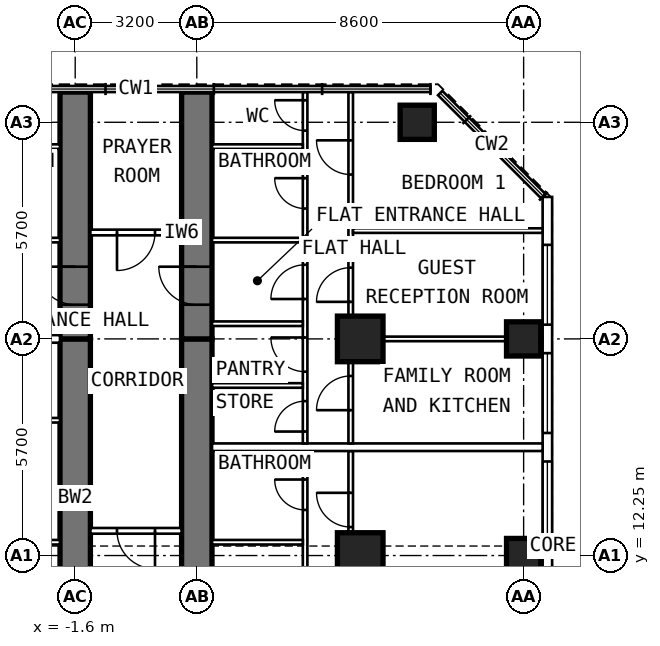
"""IFC4 building model, lengths in metres.
Left out: names, types, materials, properties, quantities, classifications, styles, units other than length and angle.
Written with IfcOpenShell. Run it as: python <this file> out.ifc"""

import sys

from ifc_helpers import new_model, si_unit, direction, frame, frame_2d, origin, origin_2d, place, context, subcontext, project, spatial, rectangle, extrude, element, fill, save


model = new_model("IFC4")
c1 = context("Model", 3, precision=1e-05, world=origin(), true_north=direction((0.0, 1.0)))
c2 = subcontext(c1, "Body", "Model", "MODEL_VIEW")
j1 = project(units=[si_unit("LENGTHUNIT", "METRE"), si_unit("PLANEANGLEUNIT", "RADIAN")], contexts=[c1])
p1 = place(None, origin())
s1 = spatial("IfcSite", under=j1, at=p1, CompositionType="ELEMENT")
p2 = place(p1, origin())
s2 = spatial("IfcBuilding", under=s1, at=p2, CompositionType="ELEMENT")
p3 = place(p2, frame((0.0, 0.0, 131.0)))
s3 = spatial("IfcBuildingStorey", under=s2, at=p3, CompositionType="ELEMENT", Elevation=131.0)
for number, where, z_axis, x_axis in (
    (1, (10.2, 12.25, 0.0), (0.0, 0.0, 1.0), (0.0, 1.0, 0.0)),
    (2, (10.2, 17.95, 0.0), (0.0, 0.0, 1.0), (0.0, 1.0, 0.0)),
    (3, (7.4, 23.65, 0.0), (0.0, 0.0, 1.0), (0.0, 1.0, 0.0)),
):
    element("IfcColumn", number, at=place(p3, frame(where, z_axis=z_axis, x_axis=x_axis)), inside=s3, PredefinedType="COLUMN", context=c2, shape_type="SweptSolid", body=[
        extrude(rectangle(XDim=0.9, YDim=0.9, at=origin_2d()), origin(), (0.0, 0.0, 1.0), 3.6),
    ])
for number, where, z_axis, x_axis in (
    (4, (5.9, 12.25, 0.0), (0.0, 0.0, 1.0), (0.0, 1.0, 0.0)),
    (5, (5.9, 17.95, 0.0), (0.0, 0.0, 1.0), (0.0, 1.0, 0.0)),
):
    element("IfcColumn", number, at=place(p3, frame(where, z_axis=z_axis, x_axis=x_axis)), inside=s3, PredefinedType="COLUMN", context=c2, shape_type="SweptSolid", body=[
        extrude(rectangle(XDim=1.2, YDim=1.2, at=origin_2d()), origin(), (0.0, 0.0, 1.0), 3.6),
    ])
p4 = place(p3, frame((-1.6, 9.6, 0.0), z_axis=(0.0, 0.0, 1.0), x_axis=(0.0, 1.0, 0.0)))
e6 = element("IfcWall", 6, at=p4, inside=s3, PredefinedType="SHEAR", context=c2, shape_type="SweptSolid", body=[
    extrude(rectangle(XDim=8.35, YDim=0.8, at=frame_2d((4.175, 0.0))), origin(), (0.0, 0.0, 1.0), 3.6),
])
p5 = place(p4, frame((1.3, 0.0, 0.0)))
e7 = element("IfcOpeningElement", 7, at=p5, cuts=e6, PredefinedType="OPENING", context=c2, shape_type="SweptSolid", body=[
    extrude(rectangle(XDim=1.0, YDim=2.1, at=frame_2d((0.5, 1.05))), frame((0.0, 0.412, 0.0), z_axis=(0.0, -1.0, 0.0), x_axis=(1.0, 0.0, 0.0)), (0.0, 0.0, 1.0), 0.824),
])
p6 = place(p3, frame((-1.6, 17.95, 0.0), z_axis=(0.0, 0.0, 1.0), x_axis=(0.0, 1.0, 0.0)))
e8 = element("IfcWall", 8, at=p6, inside=s3, PredefinedType="SHEAR", context=c2, shape_type="SweptSolid", body=[
    extrude(rectangle(XDim=6.495, YDim=0.8, at=frame_2d((3.248, 0.0))), origin(), (0.0, 0.0, 1.0), 3.6),
])
p7 = place(p6, frame((0.9, 0.0, 0.0)))
e9 = element("IfcOpeningElement", 9, at=p7, cuts=e8, PredefinedType="OPENING", context=c2, shape_type="SweptSolid", body=[
    extrude(rectangle(XDim=1.0, YDim=2.1, at=frame_2d((0.5, 1.05))), frame((0.0, 0.412, 0.0), z_axis=(0.0, -1.0, 0.0), x_axis=(1.0, 0.0, 0.0)), (0.0, 0.0, 1.0), 0.824),
])
p8 = place(p3, frame((1.6, 9.6, 0.0), z_axis=(0.0, 0.0, 1.0), x_axis=(0.0, 1.0, 0.0)))
e10 = element("IfcWall", 10, at=p8, inside=s3, PredefinedType="SHEAR", context=c2, shape_type="SweptSolid", body=[
    extrude(rectangle(XDim=8.35, YDim=0.8, at=frame_2d((4.175, 0.0))), origin(), (0.0, 0.0, 1.0), 3.6),
])
p9 = place(p8, frame((1.3, 0.0, 0.0)))
e11 = element("IfcOpeningElement", 11, at=p9, cuts=e10, PredefinedType="OPENING", context=c2, shape_type="SweptSolid", body=[
    extrude(rectangle(XDim=1.0, YDim=2.1, at=frame_2d((0.5, 1.05))), frame((0.0, 0.412, 0.0), z_axis=(0.0, -1.0, 0.0), x_axis=(1.0, 0.0, 0.0)), (0.0, 0.0, 1.0), 0.824),
])
p10 = place(p3, frame((1.6, 17.95, 0.0), z_axis=(0.0, 0.0, 1.0), x_axis=(0.0, 1.0, 0.0)))
e12 = element("IfcWall", 12, at=p10, inside=s3, PredefinedType="SHEAR", context=c2, shape_type="SweptSolid", body=[
    extrude(rectangle(XDim=6.495, YDim=0.8, at=frame_2d((3.248, 0.0))), origin(), (0.0, 0.0, 1.0), 3.6),
])
p11 = place(p10, frame((0.9, 0.0, 0.0)))
e13 = element("IfcOpeningElement", 13, at=p11, cuts=e12, PredefinedType="OPENING", context=c2, shape_type="SweptSolid", body=[
    extrude(rectangle(XDim=1.0, YDim=2.1, at=frame_2d((0.5, 1.05))), frame((0.0, 0.412, 0.0), z_axis=(0.0, -1.0, 0.0), x_axis=(1.0, 0.0, 0.0)), (0.0, 0.0, 1.0), 0.824),
])
p12 = place(p3, frame((10.825, 6.409, 0.0), z_axis=(0.0, 0.0, 1.0), x_axis=(0.0, 1.0, 0.0)))
e14 = element("IfcWall", 14, at=p12, inside=s3, PredefinedType="SOLIDWALL", context=c2, shape_type="SweptSolid", body=[
    extrude(rectangle(XDim=15.276, YDim=0.25, at=frame_2d((7.638, 0.0))), origin(), (0.0, 0.0, 1.0), 3.35),
])
p13 = place(p12, frame((0.516, 0.0, 0.8)))
e15 = element("IfcOpeningElement", 15, at=p13, cuts=e14, PredefinedType="OPENING", context=c2, shape_type="SweptSolid", body=[
    extrude(rectangle(XDim=2.1, YDim=1.8, at=frame_2d((1.05, 0.9))), frame((0.0, 0.137, 0.0), z_axis=(0.0, -1.0, 0.0), x_axis=(1.0, 0.0, 0.0)), (0.0, 0.0, 1.0), 0.274),
])
p14 = place(p12, frame((3.366, 0.0, 0.8)))
e16 = element("IfcOpeningElement", 16, at=p14, cuts=e14, PredefinedType="OPENING", context=c2, shape_type="SweptSolid", body=[
    extrude(rectangle(XDim=2.1, YDim=1.8, at=frame_2d((1.05, 0.9))), frame((0.0, 0.137, 0.0), z_axis=(0.0, -1.0, 0.0), x_axis=(1.0, 0.0, 0.0)), (0.0, 0.0, 1.0), 0.274),
])
p15 = place(p12, frame((6.216, 0.0, 0.8)))
e17 = element("IfcOpeningElement", 17, at=p15, cuts=e14, PredefinedType="OPENING", context=c2, shape_type="SweptSolid", body=[
    extrude(rectangle(XDim=2.1, YDim=1.8, at=frame_2d((1.05, 0.9))), frame((0.0, 0.137, 0.0), z_axis=(0.0, -1.0, 0.0), x_axis=(1.0, 0.0, 0.0)), (0.0, 0.0, 1.0), 0.274),
])
p16 = place(p12, frame((9.066, 0.0, 0.8)))
e18 = element("IfcOpeningElement", 18, at=p16, cuts=e14, PredefinedType="OPENING", context=c2, shape_type="SweptSolid", body=[
    extrude(rectangle(XDim=2.1, YDim=1.8, at=frame_2d((1.05, 0.9))), frame((0.0, 0.137, 0.0), z_axis=(0.0, -1.0, 0.0), x_axis=(1.0, 0.0, 0.0)), (0.0, 0.0, 1.0), 0.274),
])
p17 = place(p12, frame((11.916, 0.0, 0.8)))
e19 = element("IfcOpeningElement", 19, at=p17, cuts=e14, PredefinedType="OPENING", context=c2, shape_type="SweptSolid", body=[
    extrude(rectangle(XDim=2.1, YDim=1.8, at=frame_2d((1.05, 0.9))), frame((0.0, 0.137, 0.0), z_axis=(0.0, -1.0, 0.0), x_axis=(1.0, 0.0, 0.0)), (0.0, 0.0, 1.0), 0.274),
])
p18 = place(p3, frame((-2.0, 12.6, 0.0), z_axis=(0.0, 0.0, 1.0), x_axis=(-1.0, 0.0, 0.0)))
e20 = element("IfcWall", 20, at=p18, inside=s3, PredefinedType="PARTITIONING", context=c2, shape_type="SweptSolid", body=[
    extrude(rectangle(XDim=2.39, YDim=0.12, at=frame_2d((1.195, 0.0))), origin(), (0.0, 0.0, 1.0), 2.45),
])
for number, where, z_axis, x_axis in (
    (21, (-2.0, 15.81, 0.0), (0.0, 0.0, 1.0), (-1.0, 0.0, 0.0)),
    (22, (-2.0, 20.55, 0.0), (0.0, 0.0, 1.0), (-1.0, 0.0, 0.0)),
    (23, (-2.0, 23.01, 0.0), (0.0, 0.0, 1.0), (-1.0, 0.0, 0.0)),
):
    element("IfcWall", number, at=place(p3, frame(where, z_axis=z_axis, x_axis=x_axis)), inside=s3, PredefinedType="PARTITIONING", context=c2, shape_type="SweptSolid", body=[
        extrude(rectangle(XDim=2.39, YDim=0.12, at=frame_2d((1.195, 0.0))), origin(), (0.0, 0.0, 1.0), 3.35),
    ])
p19 = place(p3, frame((-2.0, 17.95, 0.0), z_axis=(0.0, 0.0, 1.0), x_axis=(-1.0, 0.0, 0.0)))
e24 = element("IfcWall", 24, at=p19, inside=s3, PredefinedType="PARTITIONING", context=c2, shape_type="SweptSolid", body=[
    extrude(rectangle(XDim=8.7, YDim=0.2, at=frame_2d((4.35, 0.0))), origin(), (0.0, 0.0, 1.0), 2.45),
])
p20 = place(p3, frame((4.45, 10.05, 0.0), z_axis=(0.0, 0.0, 1.0), x_axis=(0.0, 1.0, 0.0)))
e25 = element("IfcWall", 25, at=p20, inside=s3, PredefinedType="PARTITIONING", context=c2, shape_type="SweptSolid", body=[
    extrude(rectangle(XDim=4.95, YDim=0.12, at=frame_2d((2.475, 0.0))), origin(), (0.0, 0.0, 1.0), 3.35),
])
p21 = place(p20, frame((0.8, 0.0, 0.0)))
e26 = element("IfcOpeningElement", 26, at=p21, cuts=e25, PredefinedType="OPENING", context=c2, shape_type="SweptSolid", body=[
    extrude(rectangle(XDim=0.9, YDim=2.1, at=frame_2d((0.45, 1.05))), frame((0.0, 0.072, 0.0), z_axis=(0.0, -1.0, 0.0), x_axis=(1.0, 0.0, 0.0)), (0.0, 0.0, 1.0), 0.144),
])
p22 = place(p20, frame((3.4, 0.0, 0.0)))
e27 = element("IfcOpeningElement", 27, at=p22, cuts=e25, PredefinedType="OPENING", context=c2, shape_type="SweptSolid", body=[
    extrude(rectangle(XDim=0.8, YDim=2.1, at=frame_2d((0.4, 1.05))), frame((0.0, 0.072, 0.0), z_axis=(0.0, -1.0, 0.0), x_axis=(1.0, 0.0, 0.0)), (0.0, 0.0, 1.0), 0.144),
])
p23 = place(p3, frame((5.65, 9.6, 0.0), z_axis=(0.0, 0.0, 1.0), x_axis=(0.0, 1.0, 0.0)))
e28 = element("IfcWall", 28, at=p23, inside=s3, PredefinedType="PARTITIONING", context=c2, shape_type="SweptSolid", body=[
    extrude(rectangle(XDim=5.4, YDim=0.12, at=frame_2d((2.7, 0.0))), origin(), (0.0, 0.0, 1.0), 3.35),
])
p24 = place(p23, frame((3.4, 0.0, 0.0)))
e29 = element("IfcOpeningElement", 29, at=p24, cuts=e28, PredefinedType="OPENING", context=c2, shape_type="SweptSolid", body=[
    extrude(rectangle(XDim=0.9, YDim=2.1, at=frame_2d((0.45, 1.05))), frame((0.0, 0.072, 0.0), z_axis=(0.0, -1.0, 0.0), x_axis=(1.0, 0.0, 0.0)), (0.0, 0.0, 1.0), 0.144),
])
p25 = place(p3, frame((2.0, 12.6, 0.0), z_axis=(0.0, 0.0, 1.0), x_axis=(1.0, 0.0, 0.0)))
e30 = element("IfcWall", 30, at=p25, inside=s3, PredefinedType="PARTITIONING", context=c2, shape_type="SweptSolid", body=[
    extrude(rectangle(XDim=2.39, YDim=0.12, at=frame_2d((1.195, 0.0))), origin(), (0.0, 0.0, 1.0), 2.45),
])
p26 = place(p3, frame((4.45, 15.2, 0.0), z_axis=(0.0, 0.0, 1.0), x_axis=(0.0, 1.0, 0.0)))
e31 = element("IfcWall", 31, at=p26, inside=s3, PredefinedType="PARTITIONING", context=c2, shape_type="SweptSolid", body=[
    extrude(rectangle(XDim=9.245, YDim=0.12, at=frame_2d((4.623, 0.0))), origin(), (0.0, 0.0, 1.0), 3.35),
])
p27 = place(p26, frame((0.312, 0.0, 0.0)))
e32 = element("IfcOpeningElement", 32, at=p27, cuts=e31, PredefinedType="OPENING", context=c2, shape_type="SweptSolid", body=[
    extrude(rectangle(XDim=0.8, YDim=2.1, at=frame_2d((0.4, 1.05))), frame((0.0, 0.072, 0.0), z_axis=(0.0, -1.0, 0.0), x_axis=(1.0, 0.0, 0.0)), (0.0, 0.0, 1.0), 0.144),
])
p28 = place(p26, frame((1.887, 0.0, 0.0)))
e33 = element("IfcOpeningElement", 33, at=p28, cuts=e31, PredefinedType="OPENING", context=c2, shape_type="SweptSolid", body=[
    extrude(rectangle(XDim=0.9, YDim=2.1, at=frame_2d((0.45, 1.05))), frame((0.0, 0.072, 0.0), z_axis=(0.0, -1.0, 0.0), x_axis=(1.0, 0.0, 0.0)), (0.0, 0.0, 1.0), 0.144),
])
p29 = place(p26, frame((3.8, 0.0, 0.0)))
e34 = element("IfcOpeningElement", 34, at=p29, cuts=e31, PredefinedType="OPENING", context=c2, shape_type="SweptSolid", body=[
    extrude(rectangle(XDim=0.9, YDim=2.1, at=frame_2d((0.45, 1.05))), frame((0.0, 0.072, 0.0), z_axis=(0.0, -1.0, 0.0), x_axis=(1.0, 0.0, 0.0)), (0.0, 0.0, 1.0), 0.144),
])
p30 = place(p26, frame((6.18, 0.0, 0.0)))
e35 = element("IfcOpeningElement", 35, at=p30, cuts=e31, PredefinedType="OPENING", context=c2, shape_type="SweptSolid", body=[
    extrude(rectangle(XDim=0.8, YDim=2.1, at=frame_2d((0.4, 1.05))), frame((0.0, 0.072, 0.0), z_axis=(0.0, -1.0, 0.0), x_axis=(1.0, 0.0, 0.0)), (0.0, 0.0, 1.0), 0.144),
])
p31 = place(p26, frame((8.23, 0.0, 0.0)))
e36 = element("IfcOpeningElement", 36, at=p31, cuts=e31, PredefinedType="OPENING", context=c2, shape_type="SweptSolid", body=[
    extrude(rectangle(XDim=0.8, YDim=2.1, at=frame_2d((0.4, 1.05))), frame((0.0, 0.072, 0.0), z_axis=(0.0, -1.0, 0.0), x_axis=(1.0, 0.0, 0.0)), (0.0, 0.0, 1.0), 0.144),
])
p32 = place(p3, frame((5.65, 15.2, 0.0), z_axis=(0.0, 0.0, 1.0), x_axis=(0.0, 1.0, 0.0)))
e37 = element("IfcWall", 37, at=p32, inside=s3, PredefinedType="PARTITIONING", context=c2, shape_type="SweptSolid", body=[
    extrude(rectangle(XDim=9.245, YDim=0.12, at=frame_2d((4.623, 0.0))), origin(), (0.0, 0.0, 1.0), 3.35),
])
p33 = place(p32, frame((0.875, 0.0, 0.0)))
e38 = element("IfcOpeningElement", 38, at=p33, cuts=e37, PredefinedType="OPENING", context=c2, shape_type="SweptSolid", body=[
    extrude(rectangle(XDim=0.9, YDim=2.1, at=frame_2d((0.45, 1.05))), frame((0.0, 0.072, 0.0), z_axis=(0.0, -1.0, 0.0), x_axis=(1.0, 0.0, 0.0)), (0.0, 0.0, 1.0), 0.144),
])
p34 = place(p32, frame((3.725, 0.0, 0.0)))
e39 = element("IfcOpeningElement", 39, at=p34, cuts=e37, PredefinedType="OPENING", context=c2, shape_type="SweptSolid", body=[
    extrude(rectangle(XDim=0.9, YDim=2.1, at=frame_2d((0.45, 1.05))), frame((0.0, 0.072, 0.0), z_axis=(0.0, -1.0, 0.0), x_axis=(1.0, 0.0, 0.0)), (0.0, 0.0, 1.0), 0.144),
])
p35 = place(p32, frame((7.075, 0.0, 0.0)))
e40 = element("IfcOpeningElement", 40, at=p35, cuts=e37, PredefinedType="OPENING", context=c2, shape_type="SweptSolid", body=[
    extrude(rectangle(XDim=0.9, YDim=2.1, at=frame_2d((0.45, 1.05))), frame((0.0, 0.072, 0.0), z_axis=(0.0, -1.0, 0.0), x_axis=(1.0, 0.0, 0.0)), (0.0, 0.0, 1.0), 0.144),
])
p36 = place(p3, frame((5.71, 17.95, 0.0), z_axis=(0.0, 0.0, 1.0), x_axis=(1.0, 0.0, 0.0)))
e41 = element("IfcWall", 41, at=p36, inside=s3, PredefinedType="PARTITIONING", context=c2, shape_type="SweptSolid", body=[
    extrude(rectangle(XDim=4.99, YDim=0.12, at=frame_2d((2.495, 0.0))), origin(), (0.0, 0.0, 1.0), 2.45),
])
p37 = place(p3, frame((5.71, 20.8, 0.0), z_axis=(0.0, 0.0, 1.0), x_axis=(1.0, 0.0, 0.0)))
e42 = element("IfcWall", 42, at=p37, inside=s3, PredefinedType="PARTITIONING", context=c2, shape_type="SweptSolid", body=[
    extrude(rectangle(XDim=4.99, YDim=0.12, at=frame_2d((2.495, 0.0))), origin(), (0.0, 0.0, 1.0), 3.35),
])
for number, where, z_axis, x_axis in (
    (43, (2.0, 16.725, 0.0), (0.0, 0.0, 1.0), (1.0, 0.0, 0.0)),
    (44, (2.0, 18.35, 0.0), (0.0, 0.0, 1.0), (1.0, 0.0, 0.0)),
    (45, (2.0, 20.55, 0.0), (0.0, 0.0, 1.0), (1.0, 0.0, 0.0)),
    (46, (2.0, 23.01, 0.0), (0.0, 0.0, 1.0), (1.0, 0.0, 0.0)),
):
    element("IfcWall", number, at=place(p3, frame(where, z_axis=z_axis, x_axis=x_axis)), inside=s3, PredefinedType="PARTITIONING", context=c2, shape_type="SweptSolid", body=[
        extrude(rectangle(XDim=2.39, YDim=0.12, at=frame_2d((1.195, 0.0))), origin(), (0.0, 0.0, 1.0), 3.35),
    ])
p38 = place(p3, frame((2.0, 15.1, 0.0), z_axis=(0.0, 0.0, 1.0), x_axis=(1.0, 0.0, 0.0)))
e47 = element("IfcWall", 47, at=p38, inside=s3, PredefinedType="PARTITIONING", context=c2, shape_type="SweptSolid", body=[
    extrude(rectangle(XDim=8.7, YDim=0.2, at=frame_2d((4.35, 0.0))), origin(), (0.0, 0.0, 1.0), 3.35),
])
p39 = place(p3, frame((1.2, 20.75, 0.0), z_axis=(0.0, 0.0, 1.0), x_axis=(-1.0, 0.0, 0.0)))
e48 = element("IfcWall", 48, at=p39, inside=s3, PredefinedType="PARTITIONING", context=c2, shape_type="SweptSolid", body=[
    extrude(rectangle(XDim=2.4, YDim=0.15, at=frame_2d((1.2, 0.0))), origin(), (0.0, 0.0, 1.0), 3.35),
])
p40 = place(p39, frame((0.7, 0.0, 0.0)))
e49 = element("IfcOpeningElement", 49, at=p40, cuts=e48, PredefinedType="OPENING", context=c2, shape_type="SweptSolid", body=[
    extrude(rectangle(XDim=1.0, YDim=2.1, at=frame_2d((0.5, 1.05))), frame((0.0, 0.087, 0.0), z_axis=(0.0, -1.0, 0.0), x_axis=(1.0, 0.0, 0.0)), (0.0, 0.0, 1.0), 0.174),
])
p41 = place(p3, frame((1.2, 12.9, 0.0), z_axis=(0.0, 0.0, 1.0), x_axis=(-1.0, 0.0, 0.0)))
e50 = element("IfcWall", 50, at=p41, inside=s3, PredefinedType="PARTITIONING", context=c2, shape_type="SweptSolid", body=[
    extrude(rectangle(XDim=2.4, YDim=0.15, at=frame_2d((1.2, 0.0))), origin(), (0.0, 0.0, 1.0), 3.35),
])
p42 = place(p41, frame((0.7, 0.0, 0.0)))
e51 = element("IfcOpeningElement", 51, at=p42, cuts=e50, PredefinedType="OPENING", context=c2, shape_type="SweptSolid", body=[
    extrude(rectangle(XDim=1.0, YDim=2.1, at=frame_2d((0.5, 1.05))), frame((0.0, 0.087, 0.0), z_axis=(0.0, -1.0, 0.0), x_axis=(1.0, 0.0, 0.0)), (0.0, 0.0, 1.0), 0.174),
])
p43 = place(p15, origin())
e52 = element("IfcWindow", 52, at=p43, inside=s3, PartitioningType="SINGLE_PANEL", PredefinedType="WINDOW", context=c2, shape_type="SweptSolid", body=[
    extrude(rectangle(XDim=2.1, YDim=1.8, at=frame_2d((1.05, 0.9))), frame((0.0, 0.03, 0.0), z_axis=(0.0, -1.0, 0.0), x_axis=(1.0, 0.0, 0.0)), (0.0, 0.0, 1.0), 0.06),
])
fill(e17, e52)
p44 = place(p16, origin())
e53 = element("IfcWindow", 53, at=p44, inside=s3, PartitioningType="SINGLE_PANEL", PredefinedType="WINDOW", context=c2, shape_type="SweptSolid", body=[
    extrude(rectangle(XDim=2.1, YDim=1.8, at=frame_2d((1.05, 0.9))), frame((0.0, 0.03, 0.0), z_axis=(0.0, -1.0, 0.0), x_axis=(1.0, 0.0, 0.0)), (0.0, 0.0, 1.0), 0.06),
])
fill(e18, e53)
p45 = place(p17, origin())
e54 = element("IfcWindow", 54, at=p45, inside=s3, PartitioningType="SINGLE_PANEL", PredefinedType="WINDOW", context=c2, shape_type="SweptSolid", body=[
    extrude(rectangle(XDim=2.1, YDim=1.8, at=frame_2d((1.05, 0.9))), frame((0.0, 0.03, 0.0), z_axis=(0.0, -1.0, 0.0), x_axis=(1.0, 0.0, 0.0)), (0.0, 0.0, 1.0), 0.06),
])
fill(e19, e54)
p46 = place(p7, origin())
e55 = element("IfcDoor", 55, at=p46, inside=s3, OperationType="SINGLE_SWING_RIGHT", PredefinedType="DOOR", context=c2, shape_type="SweptSolid", body=[
    extrude(rectangle(XDim=1.0, YDim=2.1, at=frame_2d((0.5, 1.05))), frame((0.0, 0.15, 0.0), z_axis=(0.0, -1.0, 0.0), x_axis=(1.0, 0.0, 0.0)), (0.0, 0.0, 1.0), 0.3),
])
fill(e9, e55)
p47 = place(p24, origin())
e56 = element("IfcDoor", 56, at=p47, inside=s3, OperationType="SINGLE_SWING_RIGHT", PredefinedType="DOOR", context=c2, shape_type="SweptSolid", body=[
    extrude(rectangle(XDim=0.9, YDim=2.1, at=frame_2d((0.45, 1.05))), frame((0.0, 0.025, 0.0), z_axis=(0.0, -1.0, 0.0), x_axis=(1.0, 0.0, 0.0)), (0.0, 0.0, 1.0), 0.05),
])
fill(e29, e56)
p48 = place(p22, origin())
e57 = element("IfcDoor", 57, at=p48, inside=s3, OperationType="SINGLE_SWING_RIGHT", PredefinedType="DOOR", context=c2, shape_type="SweptSolid", body=[
    extrude(rectangle(XDim=0.8, YDim=2.1, at=frame_2d((0.4, 1.05))), frame((0.0, 0.025, 0.0), z_axis=(0.0, -1.0, 0.0), x_axis=(1.0, 0.0, 0.0)), (0.0, 0.0, 1.0), 0.05),
])
fill(e27, e57)
p49 = place(p11, origin())
e58 = element("IfcDoor", 58, at=p49, inside=s3, OperationType="SINGLE_SWING_RIGHT", PredefinedType="DOOR", context=c2, shape_type="SweptSolid", body=[
    extrude(rectangle(XDim=1.0, YDim=2.1, at=frame_2d((0.5, 1.05))), frame((0.0, 0.15, 0.0), z_axis=(0.0, -1.0, 0.0), x_axis=(1.0, 0.0, 0.0)), (0.0, 0.0, 1.0), 0.3),
])
fill(e13, e58)
p50 = place(p33, origin())
e59 = element("IfcDoor", 59, at=p50, inside=s3, OperationType="SINGLE_SWING_LEFT", PredefinedType="DOOR", context=c2, shape_type="SweptSolid", body=[
    extrude(rectangle(XDim=0.9, YDim=2.1, at=frame_2d((0.45, 1.05))), frame((0.0, 0.025, 0.0), z_axis=(0.0, -1.0, 0.0), x_axis=(1.0, 0.0, 0.0)), (0.0, 0.0, 1.0), 0.05),
])
fill(e38, e59)
p51 = place(p34, origin())
e60 = element("IfcDoor", 60, at=p51, inside=s3, OperationType="SINGLE_SWING_LEFT", PredefinedType="DOOR", context=c2, shape_type="SweptSolid", body=[
    extrude(rectangle(XDim=0.9, YDim=2.1, at=frame_2d((0.45, 1.05))), frame((0.0, 0.025, 0.0), z_axis=(0.0, -1.0, 0.0), x_axis=(1.0, 0.0, 0.0)), (0.0, 0.0, 1.0), 0.05),
])
fill(e39, e60)
p52 = place(p35, origin())
e61 = element("IfcDoor", 61, at=p52, inside=s3, OperationType="SINGLE_SWING_RIGHT", PredefinedType="DOOR", context=c2, shape_type="SweptSolid", body=[
    extrude(rectangle(XDim=0.9, YDim=2.1, at=frame_2d((0.45, 1.05))), frame((0.0, 0.025, 0.0), z_axis=(0.0, -1.0, 0.0), x_axis=(1.0, 0.0, 0.0)), (0.0, 0.0, 1.0), 0.05),
])
fill(e40, e61)
p53 = place(p27, origin())
e62 = element("IfcDoor", 62, at=p53, inside=s3, OperationType="SINGLE_SWING_LEFT", PredefinedType="DOOR", context=c2, shape_type="SweptSolid", body=[
    extrude(rectangle(XDim=0.8, YDim=2.1, at=frame_2d((0.4, 1.05))), frame((0.0, 0.025, 0.0), z_axis=(0.0, -1.0, 0.0), x_axis=(1.0, 0.0, 0.0)), (0.0, 0.0, 1.0), 0.05),
])
fill(e32, e62)
p54 = place(p28, origin())
e63 = element("IfcDoor", 63, at=p54, inside=s3, OperationType="SINGLE_SWING_RIGHT", PredefinedType="DOOR", context=c2, shape_type="SweptSolid", body=[
    extrude(rectangle(XDim=0.9, YDim=2.1, at=frame_2d((0.45, 1.05))), frame((0.0, 0.025, 0.0), z_axis=(0.0, -1.0, 0.0), x_axis=(1.0, 0.0, 0.0)), (0.0, 0.0, 1.0), 0.05),
])
fill(e33, e63)
p55 = place(p29, origin())
e64 = element("IfcDoor", 64, at=p55, inside=s3, OperationType="SINGLE_SWING_LEFT", PredefinedType="DOOR", context=c2, shape_type="SweptSolid", body=[
    extrude(rectangle(XDim=0.9, YDim=2.1, at=frame_2d((0.45, 1.05))), frame((0.0, 0.025, 0.0), z_axis=(0.0, -1.0, 0.0), x_axis=(1.0, 0.0, 0.0)), (0.0, 0.0, 1.0), 0.05),
])
fill(e34, e64)
p56 = place(p30, origin())
e65 = element("IfcDoor", 65, at=p56, inside=s3, OperationType="SINGLE_SWING_RIGHT", PredefinedType="DOOR", context=c2, shape_type="SweptSolid", body=[
    extrude(rectangle(XDim=0.8, YDim=2.1, at=frame_2d((0.4, 1.05))), frame((0.0, 0.025, 0.0), z_axis=(0.0, -1.0, 0.0), x_axis=(1.0, 0.0, 0.0)), (0.0, 0.0, 1.0), 0.05),
])
fill(e35, e65)
p57 = place(p31, origin())
e66 = element("IfcDoor", 66, at=p57, inside=s3, OperationType="SINGLE_SWING_RIGHT", PredefinedType="DOOR", context=c2, shape_type="SweptSolid", body=[
    extrude(rectangle(XDim=0.8, YDim=2.1, at=frame_2d((0.4, 1.05))), frame((0.0, 0.025, 0.0), z_axis=(0.0, -1.0, 0.0), x_axis=(1.0, 0.0, 0.0)), (0.0, 0.0, 1.0), 0.05),
])
fill(e36, e66)
p58 = place(p40, origin())
e67 = element("IfcDoor", 67, at=p58, inside=s3, OperationType="SINGLE_SWING_RIGHT", PredefinedType="DOOR", context=c2, shape_type="SweptSolid", body=[
    extrude(rectangle(XDim=1.0, YDim=2.1, at=frame_2d((0.5, 1.05))), frame((0.0, 0.025, 0.0), z_axis=(0.0, -1.0, 0.0), x_axis=(1.0, 0.0, 0.0)), (0.0, 0.0, 1.0), 0.05),
])
fill(e49, e67)
p59 = place(p42, origin())
e68 = element("IfcDoor", 68, at=p59, inside=s3, OperationType="SINGLE_SWING_LEFT", PredefinedType="DOOR", context=c2, shape_type="SweptSolid", body=[
    extrude(rectangle(XDim=1.0, YDim=2.1, at=frame_2d((0.5, 1.05))), frame((0.0, 0.025, 0.0), z_axis=(0.0, -1.0, 0.0), x_axis=(1.0, 0.0, 0.0)), (0.0, 0.0, 1.0), 0.05),
])
fill(e51, e68)
save(model, sys.argv[1])
